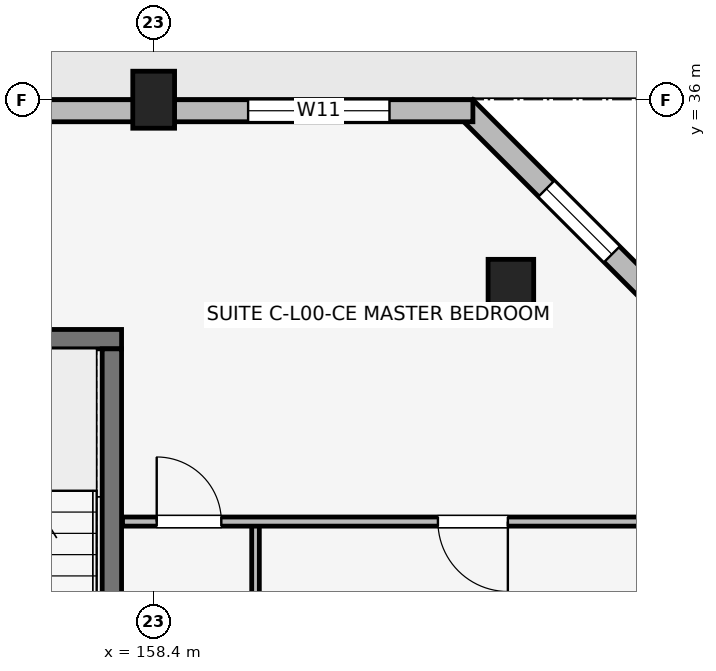
"""IFC4 building model, lengths in metres.
Left out: names, types, materials, properties, quantities, classifications, styles, units other than length and angle.
Written with IfcOpenShell. Run it as: python <this file> out.ifc"""

import sys

from ifc_helpers import new_model, si_unit, direction, frame, frame_2d, origin, origin_2d, place, context, subcontext, project, spatial, rectangle, extrude, element, fill, save


model = new_model("IFC4")
c1 = context("Model", 3, precision=1e-05, world=origin(), true_north=direction((0.0, 1.0)))
c2 = subcontext(c1, "Body", "Model", "MODEL_VIEW")
j1 = project(units=[si_unit("LENGTHUNIT", "METRE"), si_unit("PLANEANGLEUNIT", "RADIAN")], contexts=[c1])
p1 = place(None, origin())
s1 = spatial("IfcSite", under=j1, at=p1, CompositionType="ELEMENT")
p2 = place(p1, origin())
s2 = spatial("IfcBuilding", under=s1, at=p2, CompositionType="ELEMENT")
p3 = place(p2, origin())
s3 = spatial("IfcBuildingStorey", under=s2, at=p3, CompositionType="ELEMENT", Elevation=0.0)
p4 = place(p3, frame((158.4, 36.0, 0.0), z_axis=(0.0, 0.0, 1.0), x_axis=(1.0, 0.0, 0.0)))
e1 = element("IfcColumn", 1, at=p4, inside=s3, PredefinedType="COLUMN", context=c2, shape_type="SweptSolid", body=[
    extrude(rectangle(XDim=0.55, YDim=0.75, at=origin_2d()), origin(), (0.0, 0.0, 1.0), 4.5),
])
p5 = place(p3, frame((163.1, 33.5, 0.0), z_axis=(0.0, 0.0, 1.0), x_axis=(1.0, 0.0, 0.0)))
e2 = element("IfcColumn", 2, at=p5, inside=s3, PredefinedType="COLUMN", context=c2, shape_type="SweptSolid", body=[
    extrude(rectangle(XDim=0.6, YDim=0.8, at=origin_2d()), origin(), (0.0, 0.0, 1.0), 4.5),
])
p6 = place(p3, frame((154.673, 32.85, 0.0), z_axis=(0.0, 0.0, 1.0), x_axis=(1.0, 0.0, 0.0)))
e3 = element("IfcWall", 3, at=p6, inside=s3, PredefinedType="SHEAR", context=c2, shape_type="SweptSolid", body=[
    extrude(rectangle(XDim=3.305, YDim=0.255, at=frame_2d((1.652, 0.0))), origin(), (0.0, 0.0, 1.0), 4.5),
])
p7 = place(p3, frame((157.85, 26.427, 0.0), z_axis=(0.0, 0.0, 1.0), x_axis=(0.0, 1.0, 0.0)))
e4 = element("IfcWall", 4, at=p7, inside=s3, PredefinedType="SHEAR", context=c2, shape_type="SweptSolid", body=[
    extrude(rectangle(XDim=6.295, YDim=0.255, at=frame_2d((3.147, 0.0))), origin(), (0.0, 0.0, 1.0), 4.5),
])
p8 = place(p3, frame((165.498, 32.897, 0.0), z_axis=(0.0, 0.0, 1.0), x_axis=(-0.707106781187, 0.707106781187, 0.0)))
e5 = element("IfcWall", 5, at=p8, inside=s3, PredefinedType="SOLIDWALL", context=c2, shape_type="SweptSolid", body=[
    extrude(rectangle(XDim=4.243, YDim=0.29, at=frame_2d((2.121, 0.0))), origin(), (0.0, 0.0, 1.0), 4.175),
])
p9 = place(p8, frame((1.511, 0.0, 0.85)))
e6 = element("IfcOpeningElement", 6, at=p9, cuts=e5, PredefinedType="OPENING", context=c2, shape_type="SweptSolid", body=[
    extrude(rectangle(XDim=1.22, YDim=1.5, at=frame_2d((0.61, 0.75))), frame((0.0, 0.155, 0.0), z_axis=(0.0, -1.0, 0.0), x_axis=(1.0, 0.0, 0.0)), (0.0, 0.0, 1.0), 0.31),
])
p10 = place(p3, frame((162.6, 35.855, 0.0), z_axis=(0.0, 0.0, 1.0), x_axis=(-1.0, 0.0, 0.0)))
e7 = element("IfcWall", 7, at=p10, inside=s3, PredefinedType="SOLIDWALL", context=c2, shape_type="SweptSolid", body=[
    extrude(rectangle(XDim=30.0, YDim=0.29, at=frame_2d((15.0, 0.0))), origin(), (0.0, 0.0, 1.0), 3.38),
])
p11 = place(p10, frame((20.8, 0.0, 0.0), z_axis=(0.0, 0.0, 1.0), x_axis=(-1.0, 0.0, 0.0)))
e8 = element("IfcOpeningElement", 8, at=p11, cuts=e7, PredefinedType="OPENING", context=c2, shape_type="SweptSolid", body=[
    extrude(rectangle(XDim=1.1, YDim=2.15, at=frame_2d((0.55, 1.075))), frame((0.0, 0.155, 0.0), z_axis=(0.0, -1.0, 0.0), x_axis=(1.0, 0.0, 0.0)), (0.0, 0.0, 1.0), 0.31),
])
p12 = place(p10, frame((10.2, 0.0, 0.0), z_axis=(0.0, 0.0, 1.0), x_axis=(-1.0, 0.0, 0.0)))
e9 = element("IfcOpeningElement", 9, at=p12, cuts=e7, PredefinedType="OPENING", context=c2, shape_type="SweptSolid", body=[
    extrude(rectangle(XDim=1.1, YDim=2.15, at=frame_2d((0.55, 1.075))), frame((0.0, 0.155, 0.0), z_axis=(0.0, -1.0, 0.0), x_axis=(1.0, 0.0, 0.0)), (0.0, 0.0, 1.0), 0.31),
])
p13 = place(p10, frame((1.097, 0.0, 0.7)))
e10 = element("IfcOpeningElement", 10, at=p13, cuts=e7, PredefinedType="OPENING", context=c2, shape_type="SweptSolid", body=[
    extrude(rectangle(XDim=1.86, YDim=1.6, at=frame_2d((0.93, 0.8))), frame((0.0, 0.155, 0.0), z_axis=(0.0, -1.0, 0.0), x_axis=(1.0, 0.0, 0.0)), (0.0, 0.0, 1.0), 0.31),
])
p14 = place(p10, frame((26.972, 0.0, 0.7)))
e11 = element("IfcOpeningElement", 11, at=p14, cuts=e7, PredefinedType="OPENING", context=c2, shape_type="SweptSolid", body=[
    extrude(rectangle(XDim=2.0, YDim=1.65, at=frame_2d((1.0, 0.825))), frame((0.0, 0.155, 0.0), z_axis=(0.0, -1.0, 0.0), x_axis=(1.0, 0.0, 0.0)), (0.0, 0.0, 1.0), 0.31),
])
p15 = place(p3, frame((159.74, 26.1, 0.0), z_axis=(0.0, 0.0, 1.0), x_axis=(0.0, 1.0, 0.0)))
e12 = element("IfcWall", 12, at=p15, inside=s3, PredefinedType="PARTITIONING", context=c2, shape_type="SweptSolid", body=[
    extrude(rectangle(XDim=4.35, YDim=0.1, at=frame_2d((2.175, 0.0))), origin(), (0.0, 0.0, 1.0), 3.15),
])
p16 = place(p3, frame((157.99, 30.45, 0.0), z_axis=(0.0, 0.0, 1.0), x_axis=(1.0, 0.0, 0.0)))
e13 = element("IfcWall", 13, at=p16, inside=s3, PredefinedType="PARTITIONING", context=c2, shape_type="SweptSolid", body=[
    extrude(rectangle(XDim=7.47, YDim=0.12, at=frame_2d((3.735, 0.0))), origin(), (0.0, 0.0, 1.0), 3.15),
])
p17 = place(p16, frame((0.45, 0.0, 0.0)))
e14 = element("IfcOpeningElement", 14, at=p17, cuts=e13, PredefinedType="OPENING", context=c2, shape_type="SweptSolid", body=[
    extrude(rectangle(XDim=0.85, YDim=2.08, at=frame_2d((0.425, 1.04))), frame((0.0, 0.07, 0.0), z_axis=(0.0, -1.0, 0.0), x_axis=(1.0, 0.0, 0.0)), (0.0, 0.0, 1.0), 0.14),
])
p18 = place(p16, frame((5.07, 0.0, 0.0), z_axis=(0.0, 0.0, 1.0), x_axis=(-1.0, 0.0, 0.0)))
e15 = element("IfcOpeningElement", 15, at=p18, cuts=e13, PredefinedType="OPENING", context=c2, shape_type="SweptSolid", body=[
    extrude(rectangle(XDim=0.92, YDim=2.08, at=frame_2d((0.46, 1.04))), frame((0.0, 0.07, 0.0), z_axis=(0.0, -1.0, 0.0), x_axis=(1.0, 0.0, 0.0)), (0.0, 0.0, 1.0), 0.14),
])
p19 = place(p9, origin())
e16 = element("IfcWindow", 16, at=p19, inside=s3, PartitioningType="SINGLE_PANEL", PredefinedType="WINDOW", context=c2, shape_type="SweptSolid", body=[
    extrude(rectangle(XDim=1.22, YDim=1.5, at=frame_2d((0.61, 0.75))), frame((0.0, 0.03, 0.0), z_axis=(0.0, -1.0, 0.0), x_axis=(1.0, 0.0, 0.0)), (0.0, 0.0, 1.0), 0.06),
])
fill(e6, e16)
p20 = place(p13, origin())
e17 = element("IfcWindow", 17, at=p20, inside=s3, PartitioningType="SINGLE_PANEL", PredefinedType="WINDOW", context=c2, shape_type="SweptSolid", body=[
    extrude(rectangle(XDim=1.86, YDim=1.6, at=frame_2d((0.93, 0.8))), frame((0.0, 0.03, 0.0), z_axis=(0.0, -1.0, 0.0), x_axis=(1.0, 0.0, 0.0)), (0.0, 0.0, 1.0), 0.06),
])
fill(e10, e17)
p21 = place(p17, origin())
e18 = element("IfcDoor", 18, at=p21, inside=s3, OperationType="SINGLE_SWING_LEFT", PredefinedType="DOOR", context=c2, shape_type="SweptSolid", body=[
    extrude(rectangle(XDim=0.85, YDim=2.08, at=frame_2d((0.425, 1.04))), frame((0.0, 0.025, 0.0), z_axis=(0.0, -1.0, 0.0), x_axis=(1.0, 0.0, 0.0)), (0.0, 0.0, 1.0), 0.05),
])
fill(e14, e18)
p22 = place(p18, origin())
e19 = element("IfcDoor", 19, at=p22, inside=s3, OperationType="SINGLE_SWING_RIGHT", PredefinedType="DOOR", context=c2, shape_type="SweptSolid", body=[
    extrude(rectangle(XDim=0.92, YDim=2.08, at=frame_2d((0.46, 1.04))), frame((0.0, 0.025, 0.0), z_axis=(0.0, -1.0, 0.0), x_axis=(1.0, 0.0, 0.0)), (0.0, 0.0, 1.0), 0.05),
])
fill(e15, e19)
save(model, sys.argv[1])
